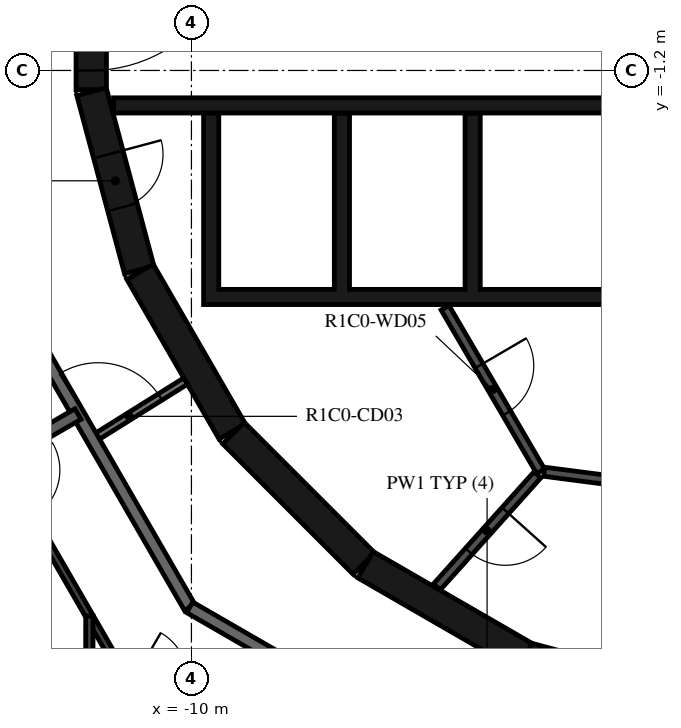
"""IFC4 building model, lengths in metres.
Left out: names, types, materials, properties, quantities, classifications, styles, units other than length and angle.
Written with IfcOpenShell. Run it as: python <this file> out.ifc"""

import sys

from ifc_helpers import new_model, si_unit, direction, frame, frame_2d, origin, place, context, subcontext, project, spatial, polyline, rectangle, outline, extrude, element, fill, save


model = new_model("IFC4")
c1 = context("Model", 3, precision=1e-05, world=origin(), true_north=direction((0.0, 1.0)))
c2 = subcontext(c1, "Body", "Model", "MODEL_VIEW")
j1 = project(units=[si_unit("LENGTHUNIT", "METRE"), si_unit("PLANEANGLEUNIT", "RADIAN")], contexts=[c1])
p1 = place(None, origin())
s1 = spatial("IfcSite", under=j1, at=p1, CompositionType="ELEMENT")
p2 = place(p1, origin())
s2 = spatial("IfcBuilding", under=s1, at=p2, CompositionType="ELEMENT")
p3 = place(p2, frame((0.0, 0.0, 59.4)))
s3 = spatial("IfcBuildingStorey", under=s2, at=p3, CompositionType="ELEMENT", Elevation=59.4)
p4 = place(p3, frame((-11.647, 1.516, 0.0), z_axis=(0.0, 0.0, 1.0), x_axis=(0.0, -1.0, 0.0)))
e1 = element("IfcWall", 1, at=p4, inside=s3, PredefinedType="SHEAR", context=c2, shape_type="SweptSolid", body=[
    extrude(rectangle(XDim=3.033, YDim=0.5, at=frame_2d((1.516, 0.0))), origin(), (0.0, 0.0, 1.0), 3.12),
])
p5 = place(p4, frame((0.316, 0.0, 0.0)))
e2 = element("IfcOpeningElement", 2, at=p5, cuts=e1, PredefinedType="OPENING", context=c2, shape_type="SweptSolid", body=[
    extrude(rectangle(XDim=2.4, YDim=2.1, at=frame_2d((1.2, 1.05))), frame((0.0, 0.26, 0.0), z_axis=(0.0, -1.0, 0.0), x_axis=(1.0, 0.0, 0.0)), (0.0, 0.0, 1.0), 0.52),
])
p6 = place(p3, frame((-11.643, -1.55, 0.0), z_axis=(0.0, 0.0, 1.0), x_axis=(0.258734743916, -0.965948410781, 0.0)))
e3 = element("IfcWall", 3, at=p6, inside=s3, PredefinedType="SHEAR", context=c2, shape_type="SweptSolid", body=[
    extrude(rectangle(XDim=3.033, YDim=0.5, at=frame_2d((1.516, 0.0))), origin(), (0.0, 0.0, 1.0), 3.12),
])
p7 = place(p6, frame((1.066, 0.0, 0.0)))
e4 = element("IfcOpeningElement", 4, at=p7, cuts=e3, PredefinedType="OPENING", context=c2, shape_type="SweptSolid", body=[
    extrude(rectangle(XDim=0.9, YDim=2.1, at=frame_2d((0.45, 1.05))), frame((0.0, 0.26, 0.0), z_axis=(0.0, -1.0, 0.0), x_axis=(1.0, 0.0, 0.0)), (0.0, 0.0, 1.0), 0.52),
])
p8 = place(p3, frame((-10.845, -4.51, 0.0), z_axis=(0.0, 0.0, 1.0), x_axis=(0.500087131594, -0.865975092491, 0.0)))
e5 = element("IfcWall", 5, at=p8, inside=s3, PredefinedType="SHEAR", context=c2, shape_type="SweptSolid", body=[
    extrude(rectangle(XDim=3.033, YDim=0.5, at=frame_2d((1.516, 0.0))), origin(), (0.0, 0.0, 1.0), 3.12),
])
p9 = place(p3, frame((-9.308, -7.164, 0.0), z_axis=(0.0, 0.0, 1.0), x_axis=(0.707106781187, -0.707106781187, 0.0)))
e6 = element("IfcWall", 6, at=p9, inside=s3, PredefinedType="SHEAR", context=c2, shape_type="SweptSolid", body=[
    extrude(rectangle(XDim=3.032, YDim=0.5, at=frame_2d((1.516, 0.0))), origin(), (0.0, 0.0, 1.0), 3.12),
])
for number, where, z_axis, x_axis in (
    (7, (-7.137, -9.329, 0.0), (0.0, 0.0, 1.0), (0.866, -0.5, 0.0)),
    (8, (-4.479, -10.858, 0.0), (0.0, 0.0, 1.0), (0.966, -0.259, 0.0)),
):
    element("IfcWall", number, at=place(p3, frame(where, z_axis=z_axis, x_axis=x_axis)), inside=s3, PredefinedType="SHEAR", context=c2, shape_type="SweptSolid", body=[
        extrude(rectangle(XDim=3.033, YDim=0.5, at=frame_2d((1.516, 0.0))), origin(), (0.0, 0.0, 1.0), 3.12),
    ])
p10 = place(p3, origin())
e9 = element("IfcWall", 9, at=p10, inside=s3, PredefinedType="SHEAR", context=c2, shape_type="SweptSolid", body=[
    extrude(outline(polyline([(9.8, -5.05), (9.8, -4.8), (9.8, -1.9), (9.55, -1.9), (9.55, -4.8), (7.65, -4.8), (7.65, -1.9), (7.4, -1.9), (7.4, -4.8), (5.5, -4.8), (5.5, -1.9), (5.25, -1.9), (5.25, -4.8), (3.35, -4.8), (3.35, -1.9), (3.1, -1.9), (3.1, -4.8), (-5.25, -4.8), (-5.25, -1.9), (-5.5, -1.9), (-5.5, -4.8), (-7.4, -4.8), (-7.4, -1.9), (-7.65, -1.9), (-7.65, -4.8), (-9.55, -4.8), (-9.55, -1.9), (-9.8, -1.9), (-9.8, -4.8), (-9.8, -5.05), (9.8, -5.05)])), origin(), (0.0, 0.0, 1.0), 3.12),
])
p11 = place(p3, frame((-11.28, -1.775, 0.0), z_axis=(0.0, 0.0, 1.0), x_axis=(1.0, 0.0, 0.0)))
e10 = element("IfcWall", 10, at=p11, inside=s3, PredefinedType="SHEAR", context=c2, shape_type="SweptSolid", body=[
    extrude(rectangle(XDim=14.38, YDim=0.25, at=frame_2d((7.19, 0.0))), origin(), (0.0, 0.0, 1.0), 3.12),
])
p12 = place(p11, frame((9.755, 0.0, 0.0)))
e11 = element("IfcOpeningElement", 11, at=p12, cuts=e10, PredefinedType="OPENING", context=c2, shape_type="SweptSolid", body=[
    extrude(rectangle(XDim=0.9, YDim=2.1, at=frame_2d((0.45, 1.05))), frame((0.0, 0.135, 0.0), z_axis=(0.0, -1.0, 0.0), x_axis=(1.0, 0.0, 0.0)), (0.0, 0.0, 1.0), 0.27),
])
p13 = place(p3, frame((-5.829, -5.102, 0.0), z_axis=(0.0, 0.0, 1.0), x_axis=(0.504480008384, -0.863423373057, 0.0)))
e12 = element("IfcWall", 12, at=p13, inside=s3, PredefinedType="PARTITIONING", context=c2, shape_type="SweptSolid", body=[
    extrude(rectangle(XDim=3.115, YDim=0.15, at=frame_2d((1.558, 0.0))), origin(), (0.0, 0.0, 1.0), 3.12),
])
p14 = place(p13, frame((1.107, 0.0, 0.0)))
e13 = element("IfcOpeningElement", 13, at=p14, cuts=e12, PredefinedType="OPENING", context=c2, shape_type="SweptSolid", body=[
    extrude(rectangle(XDim=0.9, YDim=2.1, at=frame_2d((0.45, 1.05))), frame((0.0, 0.085, 0.0), z_axis=(0.0, -1.0, 0.0), x_axis=(1.0, 0.0, 0.0)), (0.0, 0.0, 1.0), 0.17),
])
p15 = place(p3, frame((-4.311, -7.851, 0.0), z_axis=(0.0, 0.0, 1.0), x_axis=(-0.667869133096, -0.744278725383, 0.0)))
e14 = element("IfcWall", 14, at=p15, inside=s3, PredefinedType="PARTITIONING", context=c2, shape_type="SweptSolid", body=[
    extrude(rectangle(XDim=2.476, YDim=0.15, at=frame_2d((1.238, 0.0))), origin(), (0.0, 0.0, 1.0), 3.12),
])
p16 = place(p15, frame((0.788, 0.0, 0.0)))
e15 = element("IfcOpeningElement", 15, at=p16, cuts=e14, PredefinedType="OPENING", context=c2, shape_type="SweptSolid", body=[
    extrude(rectangle(XDim=0.9, YDim=2.1, at=frame_2d((0.45, 1.05))), frame((0.0, 0.085, 0.0), z_axis=(0.0, -1.0, 0.0), x_axis=(1.0, 0.0, 0.0)), (0.0, 0.0, 1.0), 0.17),
])
p17 = place(p3, frame((-4.198, -7.799, 0.0), z_axis=(0.0, 0.0, 1.0), x_axis=(0.991686747293, -0.128675542523, 0.0)))
e16 = element("IfcWall", 16, at=p17, inside=s3, PredefinedType="PARTITIONING", context=c2, shape_type="SweptSolid", body=[
    extrude(rectangle(XDim=1.793, YDim=0.15, at=frame_2d((0.896, 0.0))), origin(), (0.0, 0.0, 1.0), 3.12),
])
p18 = place(p3, frame((-11.625, -7.264, 0.0), z_axis=(0.0, 0.0, 1.0), x_axis=(0.84803632456, 0.529938102259, 0.0)))
e17 = element("IfcWall", 17, at=p18, inside=s3, PredefinedType="PARTITIONING", context=c2, shape_type="SweptSolid", body=[
    extrude(rectangle(XDim=1.804, YDim=0.12, at=frame_2d((0.902, 0.0))), origin(), (0.0, 0.0, 1.0), 3.12),
])
p19 = place(p18, frame((0.11, 0.0, 0.0)))
e18 = element("IfcOpeningElement", 18, at=p19, cuts=e17, PredefinedType="OPENING", context=c2, shape_type="SweptSolid", body=[
    extrude(rectangle(XDim=1.2, YDim=2.1, at=frame_2d((0.6, 1.05))), frame((0.0, 0.07, 0.0), z_axis=(0.0, -1.0, 0.0), x_axis=(1.0, 0.0, 0.0)), (0.0, 0.0, 1.0), 0.14),
])
p20 = place(p3, frame((-13.7, -3.671, 0.0), z_axis=(0.0, 0.0, 1.0), x_axis=(0.500001669485, -0.866024439905, 0.0)))
e19 = element("IfcWall", 19, at=p20, inside=s3, PredefinedType="STANDARD", context=c2, shape_type="SweptSolid", body=[
    extrude(rectangle(XDim=7.342, YDim=0.2, at=frame_2d((3.671, 0.0))), origin(), (0.0, 0.0, 1.0), 3.12),
])
p21 = place(p3, frame((-10.029, -10.029, 0.0), z_axis=(0.0, 0.0, 1.0), x_axis=(0.866022878987, -0.500004373052, 0.0)))
e20 = element("IfcWall", 20, at=p21, inside=s3, PredefinedType="STANDARD", context=c2, shape_type="SweptSolid", body=[
    extrude(rectangle(XDim=7.146, YDim=0.2, at=frame_2d((3.573, 0.0))), origin(), (0.0, 0.0, 1.0), 3.12),
])
p22 = place(p21, frame((5.947, 0.0, 0.0)))
e21 = element("IfcOpeningElement", 21, at=p22, cuts=e20, PredefinedType="OPENING", context=c2, shape_type="SweptSolid", body=[
    extrude(rectangle(XDim=1.0, YDim=2.1, at=frame_2d((0.5, 1.05))), frame((0.0, 0.11, 0.0), z_axis=(0.0, -1.0, 0.0), x_axis=(1.0, 0.0, 0.0)), (0.0, 0.0, 1.0), 0.22),
])
p23 = place(p3, frame((-16.565, -9.564, 0.0), z_axis=(0.0, 0.0, 1.0), x_axis=(0.866028274568, 0.499995027624, 0.0)))
e22 = element("IfcWall", 22, at=p23, inside=s3, PredefinedType="STANDARD", context=c2, shape_type="SweptSolid", body=[
    extrude(rectangle(XDim=5.427, YDim=0.2, at=frame_2d((2.714, 0.0))), origin(), (0.0, 0.0, 1.0), 3.12),
])
p24 = place(p3, frame((-13.164, -7.6, 0.0), z_axis=(0.0, 0.0, 1.0), x_axis=(0.500000928893, -0.866024867487, 0.0)))
e23 = element("IfcWall", 23, at=p24, inside=s3, PredefinedType="PARTITIONING", context=c2, shape_type="SweptSolid", body=[
    extrude(rectangle(XDim=4.073, YDim=0.12, at=frame_2d((2.036, 0.0))), origin(), (0.0, 0.0, 1.0), 3.12),
])
p25 = place(p24, frame((0.2, 0.0, 0.0)))
e24 = element("IfcOpeningElement", 24, at=p25, cuts=e23, PredefinedType="OPENING", context=c2, shape_type="SweptSolid", body=[
    extrude(rectangle(XDim=0.9, YDim=2.1, at=frame_2d((0.45, 1.05))), frame((0.0, 0.07, 0.0), z_axis=(0.0, -1.0, 0.0), x_axis=(1.0, 0.0, 0.0)), (0.0, 0.0, 1.0), 0.14),
])
p26 = place(p3, frame((-11.678, -13.63, 0.0), z_axis=(0.0, 0.0, 1.0), x_axis=(0.0, 1.0, 0.0)))
e25 = element("IfcWall", 25, at=p26, inside=s3, PredefinedType="PARTITIONING", context=c2, shape_type="SweptSolid", body=[
    extrude(rectangle(XDim=3.458, YDim=0.12, at=frame_2d((1.729, 0.0))), origin(), (0.0, 0.0, 1.0), 3.12),
])
p27 = place(p5, origin())
e26 = element("IfcDoor", 26, at=p27, inside=s3, OperationType="DOUBLE_DOOR_SINGLE_SWING", PredefinedType="DOOR", context=c2, shape_type="SweptSolid", body=[
    extrude(rectangle(XDim=2.4, YDim=2.1, at=frame_2d((1.2, 1.05))), frame((0.0, 0.025, 0.0), z_axis=(0.0, -1.0, 0.0), x_axis=(1.0, 0.0, 0.0)), (0.0, 0.0, 1.0), 0.05),
])
fill(e2, e26)
p28 = place(p16, origin())
e27 = element("IfcDoor", 27, at=p28, inside=s3, OperationType="SINGLE_SWING_LEFT", PredefinedType="DOOR", context=c2, shape_type="SweptSolid", body=[
    extrude(rectangle(XDim=0.9, YDim=2.1, at=frame_2d((0.45, 1.05))), frame((0.0, 0.025, 0.0), z_axis=(0.0, -1.0, 0.0), x_axis=(1.0, 0.0, 0.0)), (0.0, 0.0, 1.0), 0.05),
])
fill(e15, e27)
p29 = place(p14, origin())
e28 = element("IfcDoor", 28, at=p29, inside=s3, OperationType="SINGLE_SWING_RIGHT", PredefinedType="DOOR", context=c2, shape_type="SweptSolid", body=[
    extrude(rectangle(XDim=0.9, YDim=2.1, at=frame_2d((0.45, 1.05))), frame((0.0, 0.025, 0.0), z_axis=(0.0, -1.0, 0.0), x_axis=(1.0, 0.0, 0.0)), (0.0, 0.0, 1.0), 0.05),
])
fill(e13, e28)
p30 = place(p7, origin())
e29 = element("IfcDoor", 29, at=p30, inside=s3, OperationType="SINGLE_SWING_LEFT", PredefinedType="DOOR", context=c2, shape_type="SweptSolid", body=[
    extrude(rectangle(XDim=0.9, YDim=2.1, at=frame_2d((0.45, 1.05))), frame((0.0, 0.025, 0.0), z_axis=(0.0, -1.0, 0.0), x_axis=(1.0, 0.0, 0.0)), (0.0, 0.0, 1.0), 0.05),
])
fill(e4, e29)
p31 = place(p19, origin())
e30 = element("IfcDoor", 30, at=p31, inside=s3, OperationType="DOUBLE_DOOR_SINGLE_SWING", PredefinedType="DOOR", context=c2, shape_type="SweptSolid", body=[
    extrude(rectangle(XDim=1.2, YDim=2.1, at=frame_2d((0.6, 1.05))), frame((0.0, 0.025, 0.0), z_axis=(0.0, -1.0, 0.0), x_axis=(1.0, 0.0, 0.0)), (0.0, 0.0, 1.0), 0.05),
])
fill(e18, e30)
save(model, sys.argv[1])
